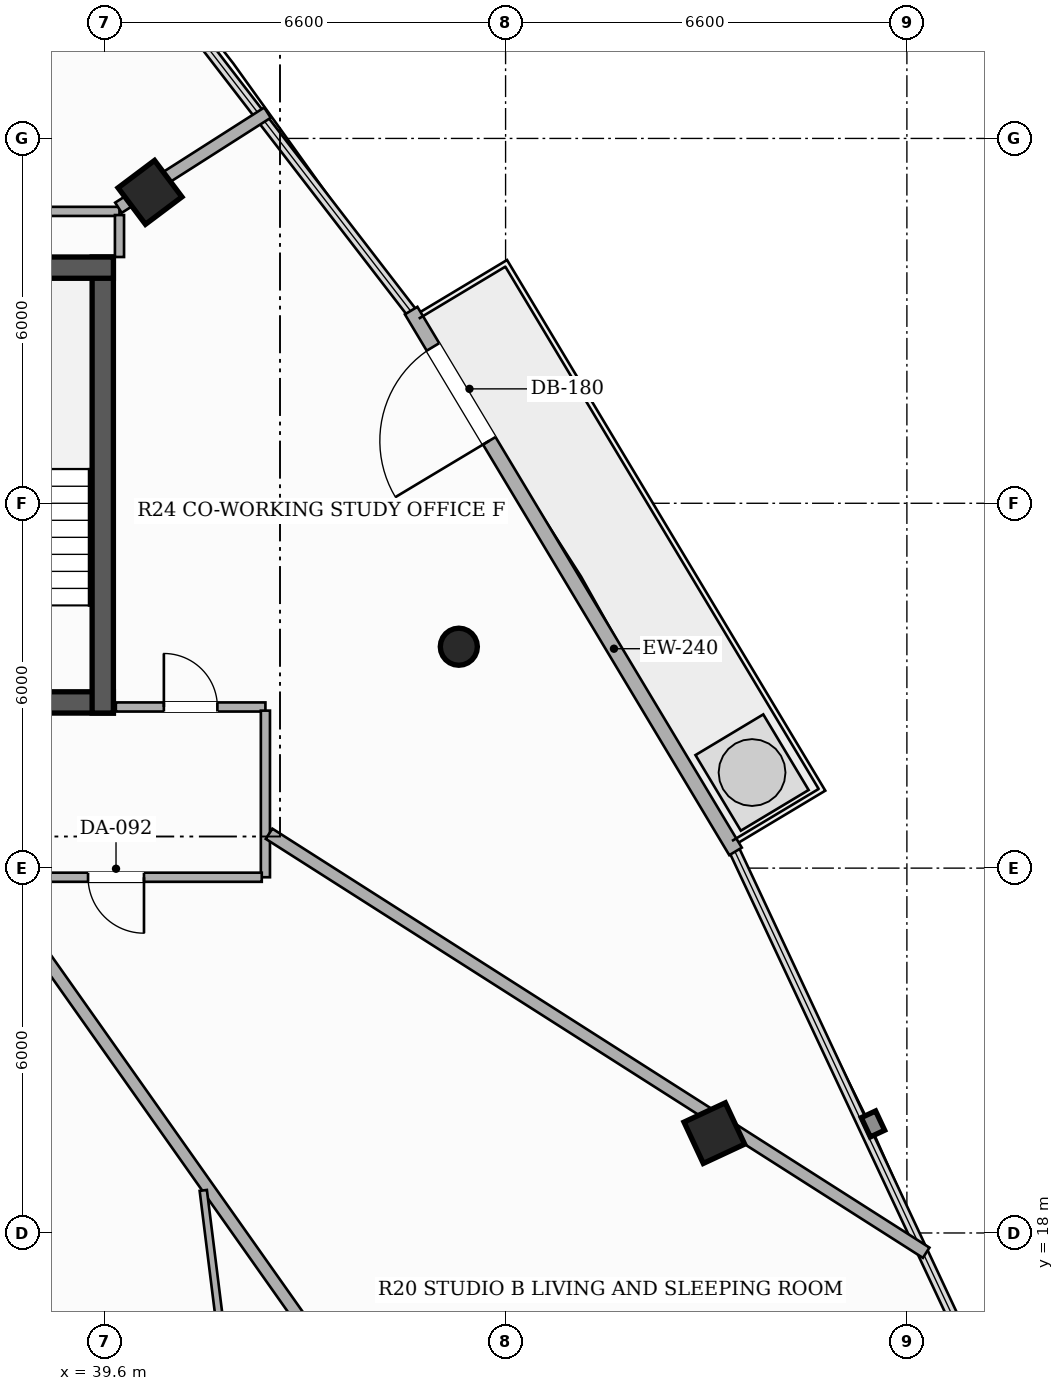
"""IFC4 building model, lengths in metres.
Left out: names, types, materials, properties, quantities, classifications, styles, units other than length and angle.
Written with IfcOpenShell. Run it as: python <this file> out.ifc"""

import sys

from ifc_helpers import new_model, si_unit, direction, frame, frame_2d, origin, origin_2d, place, context, subcontext, project, spatial, rectangle, hollow_rectangle, hollow_circle, extrude, element, fill, save


model = new_model("IFC4")
c1 = context("Model", 3, precision=1e-05, world=origin(), true_north=direction((0.0, 1.0)))
c2 = subcontext(c1, "Body", "Model", "MODEL_VIEW")
j1 = project(units=[si_unit("LENGTHUNIT", "METRE"), si_unit("PLANEANGLEUNIT", "RADIAN")], contexts=[c1])
p1 = place(None, origin())
s1 = spatial("IfcSite", under=j1, at=p1, CompositionType="ELEMENT")
p2 = place(p1, origin())
s2 = spatial("IfcBuilding", under=s1, at=p2, CompositionType="ELEMENT")
p3 = place(p2, frame((0.0, 0.0, 206.3)))
s3 = spatial("IfcBuildingStorey", under=s2, at=p3, CompositionType="ELEMENT", Elevation=206.3)
p4 = place(p3, frame((26.25, 26.725, 0.0), z_axis=(0.0, 0.0, 1.0), x_axis=(1.0, 0.0, 0.0)))
e1 = element("IfcWall", 1, at=p4, inside=s3, PredefinedType="SHEAR", context=c2, shape_type="SweptSolid", body=[
    extrude(rectangle(XDim=13.5, YDim=0.35, at=frame_2d((6.75, 0.0))), origin(), (0.0, 0.0, 1.0), 3.3),
])
p5 = place(p4, frame((4.35, 0.0, 0.0)))
e2 = element("IfcOpeningElement", 2, at=p5, cuts=e1, PredefinedType="OPENING", context=c2, shape_type="SweptSolid", body=[
    extrude(rectangle(XDim=1.05, YDim=2.15, at=frame_2d((0.525, 1.075))), frame((0.0, 0.185, 0.0), z_axis=(0.0, -1.0, 0.0), x_axis=(1.0, 0.0, 0.0)), (0.0, 0.0, 1.0), 0.37),
])
p6 = place(p4, frame((8.3, 0.0, 0.0)))
e3 = element("IfcOpeningElement", 3, at=p6, cuts=e1, PredefinedType="OPENING", context=c2, shape_type="SweptSolid", body=[
    extrude(rectangle(XDim=1.05, YDim=2.15, at=frame_2d((0.525, 1.075))), frame((0.0, 0.185, 0.0), z_axis=(0.0, -1.0, 0.0), x_axis=(1.0, 0.0, 0.0)), (0.0, 0.0, 1.0), 0.37),
])
p7 = place(p3, frame((39.575, 26.55, 0.0), z_axis=(0.0, 0.0, 1.0), x_axis=(0.0, 1.0, 0.0)))
e4 = element("IfcWall", 4, at=p7, inside=s3, PredefinedType="SHEAR", context=c2, shape_type="SweptSolid", body=[
    extrude(rectangle(XDim=7.5, YDim=0.35, at=frame_2d((3.75, 0.0))), origin(), (0.0, 0.0, 1.0), 3.3),
])
p8 = place(p3, frame((36.15, 33.875, 0.0), z_axis=(0.0, 0.0, 1.0), x_axis=(1.0, 0.0, 0.0)))
e5 = element("IfcWall", 5, at=p8, inside=s3, PredefinedType="SHEAR", context=c2, shape_type="SweptSolid", body=[
    extrude(rectangle(XDim=3.6, YDim=0.35, at=frame_2d((1.8, 0.0))), origin(), (0.0, 0.0, 1.0), 3.3),
])
p9 = place(p3, frame((49.633, 19.642, 0.0), z_axis=(0.0, 0.0, 1.0), x_axis=(-0.422618261741, 0.906307787037, 0.0)))
e6 = element("IfcColumn", 6, at=p9, inside=s3, PredefinedType="COLUMN", context=c2, shape_type="SweptSolid", body=[
    extrude(hollow_rectangle(XDim=0.75, YDim=0.75, WallThickness=0.025, at=origin_2d()), origin(), (0.0, 0.0, 1.0), 3.3),
])
p10 = place(p3, frame((45.431, 27.641, 0.0), z_axis=(0.0, 0.0, 1.0), x_axis=(1.0, 0.0, 0.0)))
e7 = element("IfcColumn", 7, at=p10, inside=s3, PredefinedType="COLUMN", context=c2, shape_type="SweptSolid", body=[
    extrude(hollow_circle(Radius=0.305, WallThickness=0.016, at=origin_2d()), origin(), (0.0, 0.0, 1.0), 3.3),
])
p11 = place(p3, frame((40.352, 35.113, 0.0), z_axis=(0.0, 0.0, 1.0), x_axis=(-0.600420225326, 0.799684658487, 0.0)))
e8 = element("IfcColumn", 8, at=p11, inside=s3, PredefinedType="COLUMN", context=c2, shape_type="SweptSolid", body=[
    extrude(hollow_rectangle(XDim=0.75, YDim=0.75, WallThickness=0.025, at=origin_2d()), origin(), (0.0, 0.0, 1.0), 3.3),
])
p12 = place(p3, frame((49.982, 24.275, 0.0), z_axis=(0.0, 0.0, 1.0), x_axis=(-0.514391899557, 0.857555230682, 0.0)))
e9 = element("IfcWall", 9, at=p12, inside=s3, PredefinedType="SOLIDWALL", context=c2, shape_type="SweptSolid", body=[
    extrude(rectangle(XDim=10.371, YDim=0.24, at=frame_2d((5.186, 0.0))), origin(), (0.0, 0.0, 1.0), 2.624),
])
p13 = place(p12, frame((7.874, 0.0, 0.0)))
e10 = element("IfcOpeningElement", 10, at=p13, cuts=e9, PredefinedType="OPENING", context=c2, shape_type="SweptSolid", body=[
    extrude(rectangle(XDim=1.8, YDim=2.2, at=frame_2d((0.9, 1.1))), frame((0.0, 0.13, 0.0), z_axis=(0.0, -1.0, 0.0), x_axis=(1.0, 0.0, 0.0)), (0.0, 0.0, 1.0), 0.26),
])
p14 = place(p3, frame((39.79, 26.65, 0.0), z_axis=(0.0, 0.0, 1.0), x_axis=(1.0, 0.0, 0.0)))
e11 = element("IfcWall", 11, at=p14, inside=s3, PredefinedType="PARTITIONING", context=c2, shape_type="SweptSolid", body=[
    extrude(rectangle(XDim=2.46, YDim=0.15, at=frame_2d((1.23, 0.0))), origin(), (0.0, 0.0, 1.0), 2.565),
])
p15 = place(p14, frame((0.79, 0.0, 0.0)))
e12 = element("IfcOpeningElement", 12, at=p15, cuts=e11, PredefinedType="OPENING", context=c2, shape_type="SweptSolid", body=[
    extrude(rectangle(XDim=0.88, YDim=2.1, at=frame_2d((0.44, 1.05))), frame((0.0, 0.085, 0.0), z_axis=(0.0, -1.0, 0.0), x_axis=(1.0, 0.0, 0.0)), (0.0, 0.0, 1.0), 0.17),
])
p16 = place(p3, frame((42.25, 26.59, 0.0), z_axis=(0.0, 0.0, 1.0), x_axis=(0.0, -1.0, 0.0)))
e13 = element("IfcWall", 13, at=p16, inside=s3, PredefinedType="PARTITIONING", context=c2, shape_type="SweptSolid", body=[
    extrude(rectangle(XDim=2.74, YDim=0.15, at=frame_2d((1.37, 0.0))), origin(), (0.0, 0.0, 1.0), 2.773),
])
p17 = place(p3, frame((42.19, 23.85, 0.0), z_axis=(0.0, 0.0, 1.0), x_axis=(-1.0, 0.0, 0.0)))
e14 = element("IfcWall", 14, at=p17, inside=s3, PredefinedType="PARTITIONING", context=c2, shape_type="SweptSolid", body=[
    extrude(rectangle(XDim=8.24, YDim=0.15, at=frame_2d((4.12, 0.0))), origin(), (0.0, 0.0, 1.0), 2.565),
])
p18 = place(p17, frame((1.937, 0.0, 0.0)))
e15 = element("IfcOpeningElement", 15, at=p18, cuts=e14, PredefinedType="OPENING", context=c2, shape_type="SweptSolid", body=[
    extrude(rectangle(XDim=0.92, YDim=2.15, at=frame_2d((0.46, 1.075))), frame((0.0, 0.085, 0.0), z_axis=(0.0, -1.0, 0.0), x_axis=(1.0, 0.0, 0.0)), (0.0, 0.0, 1.0), 0.17),
])
p19 = place(p17, frame((5.733, 0.0, 0.0)))
e16 = element("IfcOpeningElement", 16, at=p19, cuts=e14, PredefinedType="OPENING", context=c2, shape_type="SweptSolid", body=[
    extrude(rectangle(XDim=0.92, YDim=2.15, at=frame_2d((0.46, 1.075))), frame((0.0, 0.085, 0.0), z_axis=(0.0, -1.0, 0.0), x_axis=(1.0, 0.0, 0.0)), (0.0, 0.0, 1.0), 0.17),
])
p20 = place(p3, frame((36.31, 34.8, 0.0), z_axis=(0.0, 0.0, 1.0), x_axis=(1.0, 0.0, 0.0)))
e17 = element("IfcWall", 17, at=p20, inside=s3, PredefinedType="PARTITIONING", context=c2, shape_type="SweptSolid", body=[
    extrude(rectangle(XDim=3.54, YDim=0.15, at=frame_2d((1.77, 0.0))), origin(), (0.0, 0.0, 1.0), 2.425),
])
p21 = place(p3, frame((39.85, 34.74, 0.0), z_axis=(0.0, 0.0, 1.0), x_axis=(0.0, -1.0, 0.0)))
e18 = element("IfcWall", 18, at=p21, inside=s3, PredefinedType="PARTITIONING", context=c2, shape_type="SweptSolid", body=[
    extrude(rectangle(XDim=0.69, YDim=0.15, at=frame_2d((0.345, 0.0))), origin(), (0.0, 0.0, 1.0), 2.773),
])
p22 = place(p3, frame((50.316, 5.976, 0.0), z_axis=(0.0, 0.0, 1.0), x_axis=(-0.576784728977, 0.816896184603, 0.0)))
e19 = element("IfcWall", 19, at=p22, inside=s3, PredefinedType="PARTITIONING", context=c2, shape_type="SweptSolid", body=[
    extrude(rectangle(XDim=21.807, YDim=0.2, at=frame_2d((10.903, 0.0))), origin(), (0.0, 0.0, 1.0), 2.492),
])
p23 = place(p3, frame((42.31, 24.565, 0.0), z_axis=(0.0, 0.0, 1.0), x_axis=(0.843209388644, -0.537585274075, 0.0)))
e20 = element("IfcWall", 20, at=p23, inside=s3, PredefinedType="PARTITIONING", context=c2, shape_type="SweptSolid", body=[
    extrude(rectangle(XDim=12.816, YDim=0.2, at=frame_2d((6.408, 0.0))), origin(), (0.0, 0.0, 1.0), 2.492),
])
p24 = place(p3, frame((39.833, 34.86, 0.0), z_axis=(0.0, 0.0, 1.0), x_axis=(0.842993506682, 0.537923737803, 0.0)))
e21 = element("IfcWall", 21, at=p24, inside=s3, PredefinedType="PARTITIONING", context=c2, shape_type="SweptSolid", body=[
    extrude(rectangle(XDim=2.907, YDim=0.2, at=frame_2d((1.454, 0.0))), origin(), (0.0, 0.0, 1.0), 2.492),
])
p25 = place(p3, frame((41.228, 18.7, 0.0), z_axis=(0.0, 0.0, 1.0), x_axis=(0.123731094195, -0.992315784581, 0.0)))
e22 = element("IfcWall", 22, at=p25, inside=s3, PredefinedType="PARTITIONING", context=c2, shape_type="SweptSolid", body=[
    extrude(rectangle(XDim=6.432, YDim=0.12, at=frame_2d((3.216, 0.0))), origin(), (0.0, 0.0, 1.0), 3.06),
])
p26 = place(p25, frame((2.806, 0.0, 0.0)))
e23 = element("IfcOpeningElement", 23, at=p26, cuts=e22, PredefinedType="OPENING", context=c2, shape_type="SweptSolid", body=[
    extrude(rectangle(XDim=0.82, YDim=2.1, at=frame_2d((0.41, 1.05))), frame((0.0, 0.07, 0.0), z_axis=(0.0, -1.0, 0.0), x_axis=(1.0, 0.0, 0.0)), (0.0, 0.0, 1.0), 0.14),
])
p27 = place(p13, origin())
e24 = element("IfcDoor", 24, at=p27, inside=s3, OperationType="SINGLE_SWING_LEFT", PredefinedType="DOOR", context=c2, shape_type="SweptSolid", body=[
    extrude(rectangle(XDim=1.8, YDim=2.2, at=frame_2d((0.9, 1.1))), frame((0.0, 0.025, 0.0), z_axis=(0.0, -1.0, 0.0), x_axis=(1.0, 0.0, 0.0)), (0.0, 0.0, 1.0), 0.05),
])
fill(e10, e24)
p28 = place(p18, origin())
e25 = element("IfcDoor", 25, at=p28, inside=s3, OperationType="SINGLE_SWING_LEFT", PredefinedType="DOOR", context=c2, shape_type="SweptSolid", body=[
    extrude(rectangle(XDim=0.92, YDim=2.15, at=frame_2d((0.46, 1.075))), frame((0.0, 0.025, 0.0), z_axis=(0.0, -1.0, 0.0), x_axis=(1.0, 0.0, 0.0)), (0.0, 0.0, 1.0), 0.05),
])
fill(e15, e25)
p29 = place(p15, origin())
e26 = element("IfcDoor", 26, at=p29, inside=s3, OperationType="SINGLE_SWING_LEFT", PredefinedType="DOOR", context=c2, shape_type="SweptSolid", body=[
    extrude(rectangle(XDim=0.88, YDim=2.1, at=frame_2d((0.44, 1.05))), frame((0.0, 0.025, 0.0), z_axis=(0.0, -1.0, 0.0), x_axis=(1.0, 0.0, 0.0)), (0.0, 0.0, 1.0), 0.05),
])
fill(e12, e26)
save(model, sys.argv[1])
